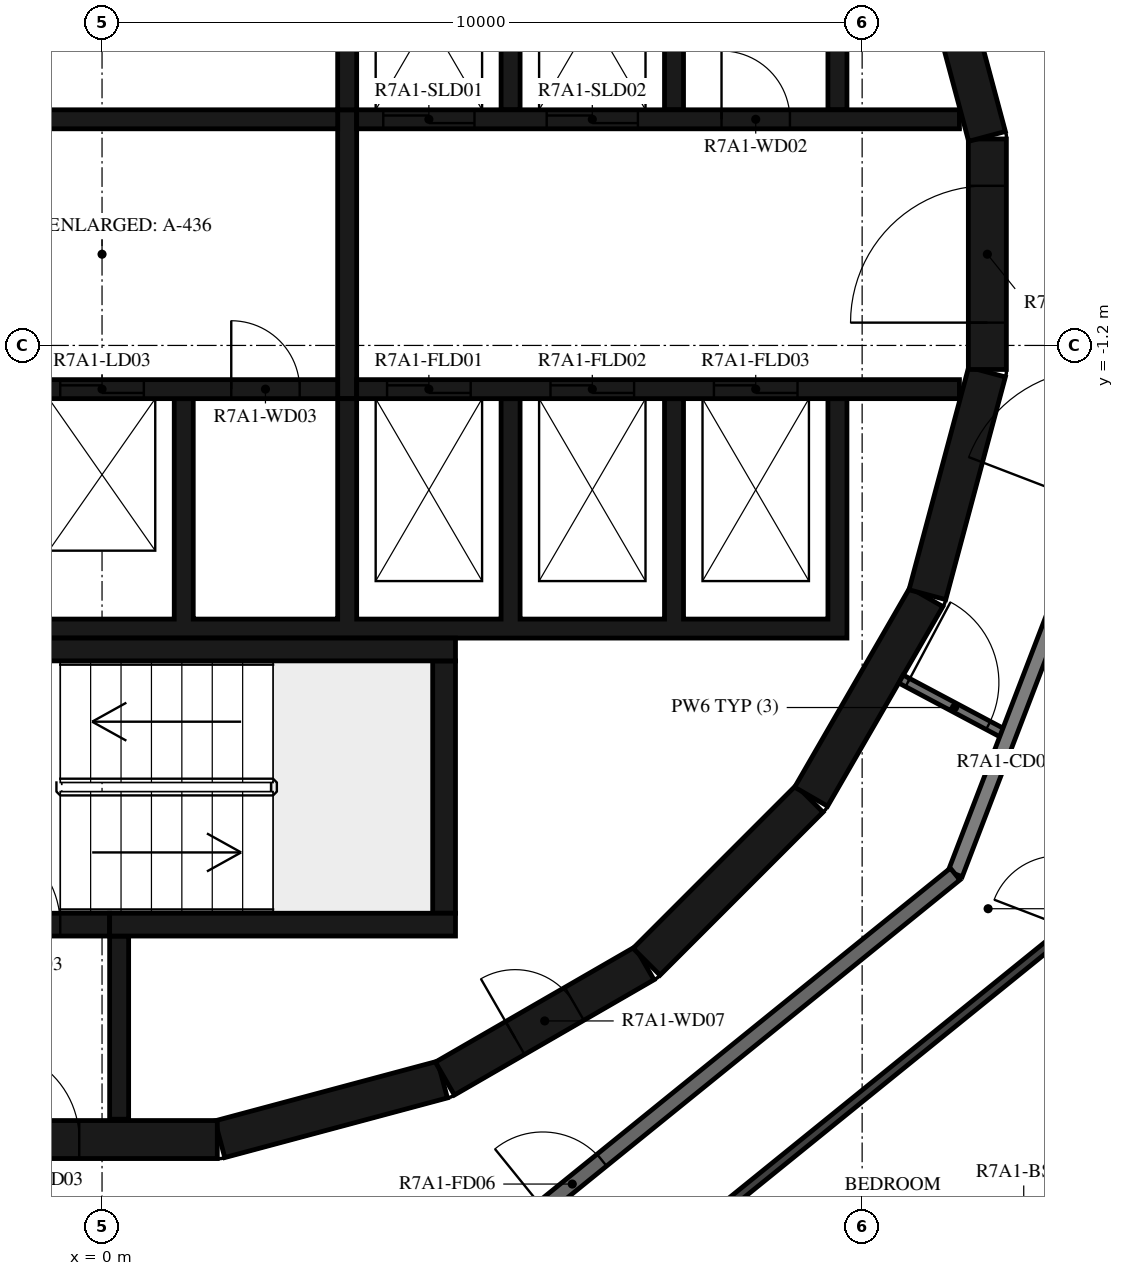
"""IFC4 building model, lengths in metres.
Left out: names, types, materials, properties, quantities, classifications, styles, units other than length and angle.
Written with IfcOpenShell. Run it as: python <this file> out.ifc"""

import sys

from ifc_helpers import new_model, si_unit, direction, frame, frame_2d, origin, place, context, subcontext, project, spatial, polyline, rectangle, outline, extrude, element, fill, save


model = new_model("IFC4")
c1 = context("Model", 3, precision=1e-05, world=origin(), true_north=direction((0.0, 1.0)))
c2 = subcontext(c1, "Body", "Model", "MODEL_VIEW")
j1 = project(units=[si_unit("LENGTHUNIT", "METRE"), si_unit("PLANEANGLEUNIT", "RADIAN")], contexts=[c1])
p1 = place(None, origin())
s1 = spatial("IfcSite", under=j1, at=p1, CompositionType="ELEMENT")
p2 = place(p1, origin())
s2 = spatial("IfcBuilding", under=s1, at=p2, CompositionType="ELEMENT")
p3 = place(p2, frame((0.0, 0.0, 266.9)))
s3 = spatial("IfcBuildingStorey", under=s2, at=p3, CompositionType="ELEMENT", Elevation=266.9)
p4 = place(p3, frame((1.55, -11.643, 0.0), z_axis=(0.0, 0.0, 1.0), x_axis=(0.965948410781, 0.258734743916, 0.0)))
e1 = element("IfcWall", 1, at=p4, inside=s3, PredefinedType="SHEAR", context=c2, shape_type="SweptSolid", body=[
    extrude(rectangle(XDim=3.033, YDim=0.5, at=frame_2d((1.516, 0.0))), origin(), (0.0, 0.0, 1.0), 3.12),
])
p5 = place(p3, frame((4.51, -10.845, 0.0), z_axis=(0.0, 0.0, 1.0), x_axis=(0.865975092491, 0.500087131594, 0.0)))
e2 = element("IfcWall", 2, at=p5, inside=s3, PredefinedType="SHEAR", context=c2, shape_type="SweptSolid", body=[
    extrude(rectangle(XDim=3.033, YDim=0.5, at=frame_2d((1.516, 0.0))), origin(), (0.0, 0.0, 1.0), 3.12),
])
p6 = place(p5, frame((1.066, 0.0, 0.0)))
e3 = element("IfcOpeningElement", 3, at=p6, cuts=e2, PredefinedType="OPENING", context=c2, shape_type="SweptSolid", body=[
    extrude(rectangle(XDim=0.9, YDim=2.1, at=frame_2d((0.45, 1.05))), frame((0.0, 0.26, 0.0), z_axis=(0.0, -1.0, 0.0), x_axis=(1.0, 0.0, 0.0)), (0.0, 0.0, 1.0), 0.52),
])
p7 = place(p3, frame((7.164, -9.308, 0.0), z_axis=(0.0, 0.0, 1.0), x_axis=(0.707106781187, 0.707106781187, 0.0)))
e4 = element("IfcWall", 4, at=p7, inside=s3, PredefinedType="SHEAR", context=c2, shape_type="SweptSolid", body=[
    extrude(rectangle(XDim=3.032, YDim=0.5, at=frame_2d((1.516, 0.0))), origin(), (0.0, 0.0, 1.0), 3.12),
])
for number, where, z_axis, x_axis in (
    (5, (9.329, -7.137, 0.0), (0.0, 0.0, 1.0), (0.5, 0.866, 0.0)),
    (6, (10.858, -4.479, 0.0), (0.0, 0.0, 1.0), (0.259, 0.966, 0.0)),
):
    element("IfcWall", number, at=place(p3, frame(where, z_axis=z_axis, x_axis=x_axis)), inside=s3, PredefinedType="SHEAR", context=c2, shape_type="SweptSolid", body=[
        extrude(rectangle(XDim=3.033, YDim=0.5, at=frame_2d((1.516, 0.0))), origin(), (0.0, 0.0, 1.0), 3.12),
    ])
p8 = place(p3, frame((11.647, -1.516, 0.0), z_axis=(0.0, 0.0, 1.0), x_axis=(0.0, 1.0, 0.0)))
e7 = element("IfcWall", 7, at=p8, inside=s3, PredefinedType="SHEAR", context=c2, shape_type="SweptSolid", body=[
    extrude(rectangle(XDim=3.033, YDim=0.5, at=frame_2d((1.516, 0.0))), origin(), (0.0, 0.0, 1.0), 3.12),
])
p9 = place(p8, frame((0.616, 0.0, 0.0)))
e8 = element("IfcOpeningElement", 8, at=p9, cuts=e7, PredefinedType="OPENING", context=c2, shape_type="SweptSolid", body=[
    extrude(rectangle(XDim=1.8, YDim=2.1, at=frame_2d((0.9, 1.05))), frame((0.0, 0.26, 0.0), z_axis=(0.0, -1.0, 0.0), x_axis=(1.0, 0.0, 0.0)), (0.0, 0.0, 1.0), 0.52),
])
p10 = place(p3, frame((11.643, 1.55, 0.0), z_axis=(0.0, 0.0, 1.0), x_axis=(-0.258734743916, 0.965948410781, 0.0)))
e9 = element("IfcWall", 9, at=p10, inside=s3, PredefinedType="SHEAR", context=c2, shape_type="SweptSolid", body=[
    extrude(rectangle(XDim=3.033, YDim=0.5, at=frame_2d((1.516, 0.0))), origin(), (0.0, 0.0, 1.0), 3.12),
])
p11 = place(p3, frame((-1.516, -11.647, 0.0), z_axis=(0.0, 0.0, 1.0), x_axis=(1.0, 0.0, 0.0)))
e10 = element("IfcWall", 10, at=p11, inside=s3, PredefinedType="SHEAR", context=c2, shape_type="SweptSolid", body=[
    extrude(rectangle(XDim=3.033, YDim=0.5, at=frame_2d((1.516, 0.0))), origin(), (0.0, 0.0, 1.0), 3.12),
])
p12 = place(p11, frame((0.016, 0.0, 0.0)))
e11 = element("IfcOpeningElement", 11, at=p12, cuts=e10, PredefinedType="OPENING", context=c2, shape_type="SweptSolid", body=[
    extrude(rectangle(XDim=1.2, YDim=2.1, at=frame_2d((0.6, 1.05))), frame((0.0, 0.26, 0.0), z_axis=(0.0, -1.0, 0.0), x_axis=(1.0, 0.0, 0.0)), (0.0, 0.0, 1.0), 0.52),
])
p13 = place(p3, frame((-2.4, -5.2, 0.0), z_axis=(0.0, 0.0, 1.0), x_axis=(1.0, 0.0, 0.0)))
e12 = element("IfcWall", 12, at=p13, inside=s3, PredefinedType="SHEAR", context=c2, shape_type="SweptSolid", body=[
    extrude(rectangle(XDim=7.05, YDim=0.3, at=frame_2d((3.525, 0.0))), origin(), (0.0, 0.0, 1.0), 3.12),
])
p14 = place(p3, frame((4.5, -8.67, 0.0), z_axis=(0.0, 0.0, 1.0), x_axis=(0.0, 1.0, 0.0)))
e13 = element("IfcWall", 13, at=p14, inside=s3, PredefinedType="SHEAR", context=c2, shape_type="SweptSolid", body=[
    extrude(rectangle(XDim=3.32, YDim=0.3, at=frame_2d((1.66, 0.0))), origin(), (0.0, 0.0, 1.0), 3.12),
])
p15 = place(p3, frame((0.1, -8.82, 0.0), z_axis=(0.0, 0.0, 1.0), x_axis=(1.0, 0.0, 0.0)))
e14 = element("IfcWall", 14, at=p15, inside=s3, PredefinedType="SHEAR", context=c2, shape_type="SweptSolid", body=[
    extrude(rectangle(XDim=4.55, YDim=0.3, at=frame_2d((2.275, 0.0))), origin(), (0.0, 0.0, 1.0), 3.12),
])
p16 = place(p3, frame((-2.4, -8.82, 0.0), z_axis=(0.0, 0.0, 1.0), x_axis=(1.0, 0.0, 0.0)))
e15 = element("IfcWall", 15, at=p16, inside=s3, PredefinedType="SHEAR", context=c2, shape_type="SweptSolid", body=[
    extrude(rectangle(XDim=2.5, YDim=0.3, at=frame_2d((1.25, 0.0))), origin(), (0.0, 0.0, 1.0), 3.12),
])
p17 = place(p16, frame((0.65, 0.0, 0.0)))
e16 = element("IfcOpeningElement", 16, at=p17, cuts=e15, PredefinedType="OPENING", context=c2, shape_type="SweptSolid", body=[
    extrude(rectangle(XDim=1.2, YDim=2.1, at=frame_2d((0.6, 1.05))), frame((0.0, 0.16, 0.0), z_axis=(0.0, -1.0, 0.0), x_axis=(1.0, 0.0, 0.0)), (0.0, 0.0, 1.0), 0.32),
])
p18 = place(p3, frame((0.225, -8.97, 0.0), z_axis=(0.0, 0.0, 1.0), x_axis=(0.0, -1.0, 0.0)))
e17 = element("IfcWall", 17, at=p18, inside=s3, PredefinedType="SHEAR", context=c2, shape_type="SweptSolid", body=[
    extrude(rectangle(XDim=2.41, YDim=0.25, at=frame_2d((1.205, 0.0))), origin(), (0.0, 0.0, 1.0), 3.12),
])
p19 = place(p3, origin())
e18 = element("IfcWall", 18, at=p19, inside=s3, PredefinedType="SHEAR", context=c2, shape_type="SweptSolid", body=[
    extrude(outline(polyline([(-9.8, 1.9), (-9.55, 1.9), (-9.55, 4.8), (3.1, 4.8), (3.1, 1.9), (3.35, 1.9), (3.35, 4.8), (5.25, 4.8), (5.25, 1.9), (5.5, 1.9), (5.5, 4.8), (7.4, 4.8), (7.4, 1.9), (7.65, 1.9), (7.65, 4.8), (9.55, 4.8), (9.55, 1.9), (9.8, 1.9), (9.8, 4.8), (9.8, 5.05), (-9.8, 5.05), (-9.8, 4.8), (-9.8, 1.9)])), origin(), (0.0, 0.0, 1.0), 3.12),
])
p20 = place(p3, origin())
e19 = element("IfcWall", 19, at=p20, inside=s3, PredefinedType="SHEAR", context=c2, shape_type="SweptSolid", body=[
    extrude(outline(polyline([(9.8, -5.05), (9.8, -4.8), (9.8, -1.9), (9.55, -1.9), (9.55, -4.8), (7.65, -4.8), (7.65, -1.9), (7.4, -1.9), (7.4, -4.8), (5.5, -4.8), (5.5, -1.9), (5.25, -1.9), (5.25, -4.8), (3.35, -4.8), (3.35, -1.9), (3.1, -1.9), (3.1, -4.8), (1.2, -4.8), (1.2, -1.9), (0.95, -1.9), (0.95, -4.8), (-0.95, -4.8), (-0.95, -1.9), (-1.2, -1.9), (-1.2, -4.8), (-3.1, -4.8), (-3.1, -1.9), (-3.35, -1.9), (-3.35, -4.8), (-5.25, -4.8), (-5.25, -1.9), (-5.5, -1.9), (-5.5, -4.8), (-7.4, -4.8), (-7.4, -1.9), (-7.65, -1.9), (-7.65, -4.8), (-9.55, -4.8), (-9.55, -1.9), (-9.8, -1.9), (-9.8, -4.8), (-9.8, -5.05), (9.8, -5.05)])), origin(), (0.0, 0.0, 1.0), 3.12),
])
p21 = place(p3, frame((-11.28, 1.775, 0.0), z_axis=(0.0, 0.0, 1.0), x_axis=(1.0, 0.0, 0.0)))
e20 = element("IfcWall", 20, at=p21, inside=s3, PredefinedType="SHEAR", context=c2, shape_type="SweptSolid", body=[
    extrude(rectangle(XDim=14.38, YDim=0.25, at=frame_2d((7.19, 0.0))), origin(), (0.0, 0.0, 1.0), 3.12),
])
p22 = place(p21, frame((7.605, 0.0, 0.0)))
e21 = element("IfcOpeningElement", 21, at=p22, cuts=e20, PredefinedType="OPENING", context=c2, shape_type="SweptSolid", body=[
    extrude(rectangle(XDim=0.9, YDim=2.1, at=frame_2d((0.45, 1.05))), frame((0.0, 0.135, 0.0), z_axis=(0.0, -1.0, 0.0), x_axis=(1.0, 0.0, 0.0)), (0.0, 0.0, 1.0), 0.27),
])
p23 = place(p3, frame((3.35, 1.775, 0.0), z_axis=(0.0, 0.0, 1.0), x_axis=(1.0, 0.0, 0.0)))
e22 = element("IfcWall", 22, at=p23, inside=s3, PredefinedType="SHEAR", context=c2, shape_type="SweptSolid", body=[
    extrude(rectangle(XDim=7.93, YDim=0.25, at=frame_2d((3.965, 0.0))), origin(), (0.0, 0.0, 1.0), 3.12),
])
p24 = place(p23, frame((0.35, 0.0, 0.0)))
e23 = element("IfcOpeningElement", 23, at=p24, cuts=e22, PredefinedType="OPENING", context=c2, shape_type="SweptSolid", body=[
    extrude(rectangle(XDim=1.2, YDim=2.4, at=frame_2d((0.6, 1.2))), frame((0.0, 0.135, 0.0), z_axis=(0.0, -1.0, 0.0), x_axis=(1.0, 0.0, 0.0)), (0.0, 0.0, 1.0), 0.27),
])
p25 = place(p23, frame((2.5, 0.0, 0.0)))
e24 = element("IfcOpeningElement", 24, at=p25, cuts=e22, PredefinedType="OPENING", context=c2, shape_type="SweptSolid", body=[
    extrude(rectangle(XDim=1.2, YDim=2.4, at=frame_2d((0.6, 1.2))), frame((0.0, 0.135, 0.0), z_axis=(0.0, -1.0, 0.0), x_axis=(1.0, 0.0, 0.0)), (0.0, 0.0, 1.0), 0.27),
])
p26 = place(p23, frame((4.8, 0.0, 0.0)))
e25 = element("IfcOpeningElement", 25, at=p26, cuts=e22, PredefinedType="OPENING", context=c2, shape_type="SweptSolid", body=[
    extrude(rectangle(XDim=0.9, YDim=2.1, at=frame_2d((0.45, 1.05))), frame((0.0, 0.135, 0.0), z_axis=(0.0, -1.0, 0.0), x_axis=(1.0, 0.0, 0.0)), (0.0, 0.0, 1.0), 0.27),
])
p27 = place(p3, frame((-11.28, -1.775, 0.0), z_axis=(0.0, 0.0, 1.0), x_axis=(1.0, 0.0, 0.0)))
e26 = element("IfcWall", 26, at=p27, inside=s3, PredefinedType="SHEAR", context=c2, shape_type="SweptSolid", body=[
    extrude(rectangle(XDim=14.38, YDim=0.25, at=frame_2d((7.19, 0.0))), origin(), (0.0, 0.0, 1.0), 3.12),
])
p28 = place(p27, frame((6.43, 0.0, 0.0)))
e27 = element("IfcOpeningElement", 27, at=p28, cuts=e26, PredefinedType="OPENING", context=c2, shape_type="SweptSolid", body=[
    extrude(rectangle(XDim=1.1, YDim=2.1, at=frame_2d((0.55, 1.05))), frame((0.0, 0.135, 0.0), z_axis=(0.0, -1.0, 0.0), x_axis=(1.0, 0.0, 0.0)), (0.0, 0.0, 1.0), 0.27),
])
p29 = place(p27, frame((8.58, 0.0, 0.0)))
e28 = element("IfcOpeningElement", 28, at=p29, cuts=e26, PredefinedType="OPENING", context=c2, shape_type="SweptSolid", body=[
    extrude(rectangle(XDim=1.1, YDim=2.1, at=frame_2d((0.55, 1.05))), frame((0.0, 0.135, 0.0), z_axis=(0.0, -1.0, 0.0), x_axis=(1.0, 0.0, 0.0)), (0.0, 0.0, 1.0), 0.27),
])
p30 = place(p27, frame((10.73, 0.0, 0.0)))
e29 = element("IfcOpeningElement", 29, at=p30, cuts=e26, PredefinedType="OPENING", context=c2, shape_type="SweptSolid", body=[
    extrude(rectangle(XDim=1.1, YDim=2.1, at=frame_2d((0.55, 1.05))), frame((0.0, 0.135, 0.0), z_axis=(0.0, -1.0, 0.0), x_axis=(1.0, 0.0, 0.0)), (0.0, 0.0, 1.0), 0.27),
])
p31 = place(p27, frame((12.98, 0.0, 0.0)))
e30 = element("IfcOpeningElement", 30, at=p31, cuts=e26, PredefinedType="OPENING", context=c2, shape_type="SweptSolid", body=[
    extrude(rectangle(XDim=0.9, YDim=2.1, at=frame_2d((0.45, 1.05))), frame((0.0, 0.135, 0.0), z_axis=(0.0, -1.0, 0.0), x_axis=(1.0, 0.0, 0.0)), (0.0, 0.0, 1.0), 0.27),
])
p32 = place(p3, frame((3.35, -1.775, 0.0), z_axis=(0.0, 0.0, 1.0), x_axis=(1.0, 0.0, 0.0)))
e31 = element("IfcWall", 31, at=p32, inside=s3, PredefinedType="SHEAR", context=c2, shape_type="SweptSolid", body=[
    extrude(rectangle(XDim=7.93, YDim=0.25, at=frame_2d((3.965, 0.0))), origin(), (0.0, 0.0, 1.0), 3.12),
])
p33 = place(p32, frame((0.4, 0.0, 0.0)))
e32 = element("IfcOpeningElement", 32, at=p33, cuts=e31, PredefinedType="OPENING", context=c2, shape_type="SweptSolid", body=[
    extrude(rectangle(XDim=1.1, YDim=2.4, at=frame_2d((0.55, 1.2))), frame((0.0, 0.135, 0.0), z_axis=(0.0, -1.0, 0.0), x_axis=(1.0, 0.0, 0.0)), (0.0, 0.0, 1.0), 0.27),
])
p34 = place(p32, frame((2.55, 0.0, 0.0)))
e33 = element("IfcOpeningElement", 33, at=p34, cuts=e31, PredefinedType="OPENING", context=c2, shape_type="SweptSolid", body=[
    extrude(rectangle(XDim=1.1, YDim=2.4, at=frame_2d((0.55, 1.2))), frame((0.0, 0.135, 0.0), z_axis=(0.0, -1.0, 0.0), x_axis=(1.0, 0.0, 0.0)), (0.0, 0.0, 1.0), 0.27),
])
p35 = place(p32, frame((4.7, 0.0, 0.0)))
e34 = element("IfcOpeningElement", 34, at=p35, cuts=e31, PredefinedType="OPENING", context=c2, shape_type="SweptSolid", body=[
    extrude(rectangle(XDim=1.1, YDim=2.4, at=frame_2d((0.55, 1.2))), frame((0.0, 0.135, 0.0), z_axis=(0.0, -1.0, 0.0), x_axis=(1.0, 0.0, 0.0)), (0.0, 0.0, 1.0), 0.27),
])
p36 = place(p3, frame((3.225, -1.9, 0.0), z_axis=(0.0, 0.0, 1.0), x_axis=(0.0, 1.0, 0.0)))
e35 = element("IfcWall", 35, at=p36, inside=s3, PredefinedType="SHEAR", context=c2, shape_type="SweptSolid", body=[
    extrude(rectangle(XDim=3.8, YDim=0.25, at=frame_2d((1.9, 0.0))), origin(), (0.0, 0.0, 1.0), 3.12),
])
p37 = place(p3, frame((10.511, -5.589, 0.0), z_axis=(0.0, 0.0, 1.0), x_axis=(0.882983002821, -0.469404960273, 0.0)))
e36 = element("IfcWall", 36, at=p37, inside=s3, PredefinedType="PARTITIONING", context=c2, shape_type="SweptSolid", body=[
    extrude(rectangle(XDim=1.596, YDim=0.12, at=frame_2d((0.798, 0.0))), origin(), (0.0, 0.0, 1.0), 3.12),
])
p38 = place(p37, frame((0.1, 0.0, 0.0)))
e37 = element("IfcOpeningElement", 37, at=p38, cuts=e36, PredefinedType="OPENING", context=c2, shape_type="SweptSolid", body=[
    extrude(rectangle(XDim=1.2, YDim=2.1, at=frame_2d((0.6, 1.05))), frame((0.0, 0.07, 0.0), z_axis=(0.0, -1.0, 0.0), x_axis=(1.0, 0.0, 0.0)), (0.0, 0.0, 1.0), 0.14),
])
p39 = place(p3, frame((11.223, -8.154, 0.0), z_axis=(0.0, 0.0, 1.0), x_axis=(0.358341090983, 0.93359073609, 0.0)))
e38 = element("IfcWall", 38, at=p39, inside=s3, PredefinedType="STANDARD", context=c2, shape_type="SweptSolid", body=[
    extrude(rectangle(XDim=7.181, YDim=0.2, at=frame_2d((3.59, 0.0))), origin(), (0.0, 0.0, 1.0), 3.12),
])
p40 = place(p39, frame((5.185, 0.0, 0.0)))
e39 = element("IfcOpeningElement", 39, at=p40, cuts=e38, PredefinedType="OPENING", context=c2, shape_type="SweptSolid", body=[
    extrude(rectangle(XDim=1.8, YDim=2.1, at=frame_2d((0.9, 1.05))), frame((0.0, 0.11, 0.0), z_axis=(0.0, -1.0, 0.0), x_axis=(1.0, 0.0, 0.0)), (0.0, 0.0, 1.0), 0.22),
])
p41 = place(p3, frame((5.643, -12.673, 0.0), z_axis=(0.0, 0.0, 1.0), x_axis=(0.777160148113, 0.629302871585, 0.0)))
e40 = element("IfcWall", 40, at=p41, inside=s3, PredefinedType="STANDARD", context=c2, shape_type="SweptSolid", body=[
    extrude(rectangle(XDim=7.181, YDim=0.2, at=frame_2d((3.59, 0.0))), origin(), (0.0, 0.0, 1.0), 3.12),
])
p42 = place(p41, frame((0.2, 0.0, 0.0)))
e41 = element("IfcOpeningElement", 41, at=p42, cuts=e40, PredefinedType="OPENING", context=c2, shape_type="SweptSolid", body=[
    extrude(rectangle(XDim=1.0, YDim=2.1, at=frame_2d((0.5, 1.05))), frame((0.0, 0.11, 0.0), z_axis=(0.0, -1.0, 0.0), x_axis=(1.0, 0.0, 0.0)), (0.0, 0.0, 1.0), 0.22),
])
p43 = place(p3, frame((6.274, -14.092, 0.0), z_axis=(0.0, 0.0, 1.0), x_axis=(0.777135206268, 0.62933367237, 0.0)))
e42 = element("IfcWall", 42, at=p43, inside=s3, PredefinedType="PARTITIONING", context=c2, shape_type="SweptSolid", body=[
    extrude(rectangle(XDim=7.985, YDim=0.12, at=frame_2d((3.992, 0.0))), origin(), (0.0, 0.0, 1.0), 3.12),
])
p44 = place(p43, frame((0.2, 0.0, 0.0)))
e43 = element("IfcOpeningElement", 43, at=p44, cuts=e42, PredefinedType="OPENING", context=c2, shape_type="SweptSolid", body=[
    extrude(rectangle(XDim=0.9, YDim=2.1, at=frame_2d((0.45, 1.05))), frame((0.0, 0.07, 0.0), z_axis=(0.0, -1.0, 0.0), x_axis=(1.0, 0.0, 0.0)), (0.0, 0.0, 1.0), 0.14),
])
p45 = place(p17, origin())
e44 = element("IfcDoor", 44, at=p45, inside=s3, OperationType="SINGLE_SWING_LEFT", PredefinedType="DOOR", context=c2, shape_type="SweptSolid", body=[
    extrude(rectangle(XDim=1.2, YDim=2.1, at=frame_2d((0.6, 1.05))), frame((0.0, 0.025, 0.0), z_axis=(0.0, -1.0, 0.0), x_axis=(1.0, 0.0, 0.0)), (0.0, 0.0, 1.0), 0.05),
])
fill(e16, e44)
p46 = place(p12, origin())
e45 = element("IfcDoor", 45, at=p46, inside=s3, OperationType="SINGLE_SWING_RIGHT", PredefinedType="DOOR", context=c2, shape_type="SweptSolid", body=[
    extrude(rectangle(XDim=1.2, YDim=2.1, at=frame_2d((0.6, 1.05))), frame((0.0, 0.025, 0.0), z_axis=(0.0, -1.0, 0.0), x_axis=(1.0, 0.0, 0.0)), (0.0, 0.0, 1.0), 0.05),
])
fill(e11, e45)
p47 = place(p9, origin())
e46 = element("IfcDoor", 46, at=p47, inside=s3, OperationType="DOUBLE_DOOR_SINGLE_SWING", PredefinedType="DOOR", context=c2, shape_type="SweptSolid", body=[
    extrude(rectangle(XDim=1.8, YDim=2.1, at=frame_2d((0.9, 1.05))), frame((0.0, 0.025, 0.0), z_axis=(0.0, -1.0, 0.0), x_axis=(1.0, 0.0, 0.0)), (0.0, 0.0, 1.0), 0.05),
])
fill(e8, e46)
p48 = place(p24, origin())
e47 = element("IfcDoor", 47, at=p48, inside=s3, OperationType="DOUBLE_DOOR_SLIDING", PredefinedType="DOOR", context=c2, shape_type="SweptSolid", body=[
    extrude(rectangle(XDim=1.2, YDim=2.4, at=frame_2d((0.6, 1.2))), frame((0.0, 0.025, 0.0), z_axis=(0.0, -1.0, 0.0), x_axis=(1.0, 0.0, 0.0)), (0.0, 0.0, 1.0), 0.05),
])
fill(e23, e47)
p49 = place(p25, origin())
e48 = element("IfcDoor", 48, at=p49, inside=s3, OperationType="DOUBLE_DOOR_SLIDING", PredefinedType="DOOR", context=c2, shape_type="SweptSolid", body=[
    extrude(rectangle(XDim=1.2, YDim=2.4, at=frame_2d((0.6, 1.2))), frame((0.0, 0.025, 0.0), z_axis=(0.0, -1.0, 0.0), x_axis=(1.0, 0.0, 0.0)), (0.0, 0.0, 1.0), 0.05),
])
fill(e24, e48)
p50 = place(p30, origin())
e49 = element("IfcDoor", 49, at=p50, inside=s3, OperationType="DOUBLE_DOOR_SLIDING", PredefinedType="DOOR", context=c2, shape_type="SweptSolid", body=[
    extrude(rectangle(XDim=1.1, YDim=2.1, at=frame_2d((0.55, 1.05))), frame((0.0, 0.025, 0.0), z_axis=(0.0, -1.0, 0.0), x_axis=(1.0, 0.0, 0.0)), (0.0, 0.0, 1.0), 0.05),
])
fill(e29, e49)
p51 = place(p33, origin())
e50 = element("IfcDoor", 50, at=p51, inside=s3, OperationType="DOUBLE_DOOR_SLIDING", PredefinedType="DOOR", context=c2, shape_type="SweptSolid", body=[
    extrude(rectangle(XDim=1.1, YDim=2.4, at=frame_2d((0.55, 1.2))), frame((0.0, 0.025, 0.0), z_axis=(0.0, -1.0, 0.0), x_axis=(1.0, 0.0, 0.0)), (0.0, 0.0, 1.0), 0.05),
])
fill(e32, e50)
p52 = place(p34, origin())
e51 = element("IfcDoor", 51, at=p52, inside=s3, OperationType="DOUBLE_DOOR_SLIDING", PredefinedType="DOOR", context=c2, shape_type="SweptSolid", body=[
    extrude(rectangle(XDim=1.1, YDim=2.4, at=frame_2d((0.55, 1.2))), frame((0.0, 0.025, 0.0), z_axis=(0.0, -1.0, 0.0), x_axis=(1.0, 0.0, 0.0)), (0.0, 0.0, 1.0), 0.05),
])
fill(e33, e51)
p53 = place(p35, origin())
e52 = element("IfcDoor", 52, at=p53, inside=s3, OperationType="DOUBLE_DOOR_SLIDING", PredefinedType="DOOR", context=c2, shape_type="SweptSolid", body=[
    extrude(rectangle(XDim=1.1, YDim=2.4, at=frame_2d((0.55, 1.2))), frame((0.0, 0.025, 0.0), z_axis=(0.0, -1.0, 0.0), x_axis=(1.0, 0.0, 0.0)), (0.0, 0.0, 1.0), 0.05),
])
fill(e34, e52)
p54 = place(p26, origin())
e53 = element("IfcDoor", 53, at=p54, inside=s3, OperationType="SINGLE_SWING_RIGHT", PredefinedType="DOOR", context=c2, shape_type="SweptSolid", body=[
    extrude(rectangle(XDim=0.9, YDim=2.1, at=frame_2d((0.45, 1.05))), frame((0.0, 0.025, 0.0), z_axis=(0.0, -1.0, 0.0), x_axis=(1.0, 0.0, 0.0)), (0.0, 0.0, 1.0), 0.05),
])
fill(e25, e53)
p55 = place(p31, origin())
e54 = element("IfcDoor", 54, at=p55, inside=s3, OperationType="SINGLE_SWING_LEFT", PredefinedType="DOOR", context=c2, shape_type="SweptSolid", body=[
    extrude(rectangle(XDim=0.9, YDim=2.1, at=frame_2d((0.45, 1.05))), frame((0.0, 0.025, 0.0), z_axis=(0.0, -1.0, 0.0), x_axis=(1.0, 0.0, 0.0)), (0.0, 0.0, 1.0), 0.05),
])
fill(e30, e54)
p56 = place(p6, origin())
e55 = element("IfcDoor", 55, at=p56, inside=s3, OperationType="SINGLE_SWING_LEFT", PredefinedType="DOOR", context=c2, shape_type="SweptSolid", body=[
    extrude(rectangle(XDim=0.9, YDim=2.1, at=frame_2d((0.45, 1.05))), frame((0.0, 0.025, 0.0), z_axis=(0.0, -1.0, 0.0), x_axis=(1.0, 0.0, 0.0)), (0.0, 0.0, 1.0), 0.05),
])
fill(e3, e55)
p57 = place(p42, origin())
e56 = element("IfcDoor", 56, at=p57, inside=s3, OperationType="SINGLE_SWING_LEFT", PredefinedType="DOOR", context=c2, shape_type="SweptSolid", body=[
    extrude(rectangle(XDim=1.0, YDim=2.1, at=frame_2d((0.5, 1.05))), frame((0.0, 0.025, 0.0), z_axis=(0.0, -1.0, 0.0), x_axis=(1.0, 0.0, 0.0)), (0.0, 0.0, 1.0), 0.05),
])
fill(e41, e56)
p58 = place(p38, origin())
e57 = element("IfcDoor", 57, at=p58, inside=s3, OperationType="DOUBLE_DOOR_SINGLE_SWING", PredefinedType="DOOR", context=c2, shape_type="SweptSolid", body=[
    extrude(rectangle(XDim=1.2, YDim=2.1, at=frame_2d((0.6, 1.05))), frame((0.0, 0.025, 0.0), z_axis=(0.0, -1.0, 0.0), x_axis=(1.0, 0.0, 0.0)), (0.0, 0.0, 1.0), 0.05),
])
fill(e37, e57)
save(model, sys.argv[1])
